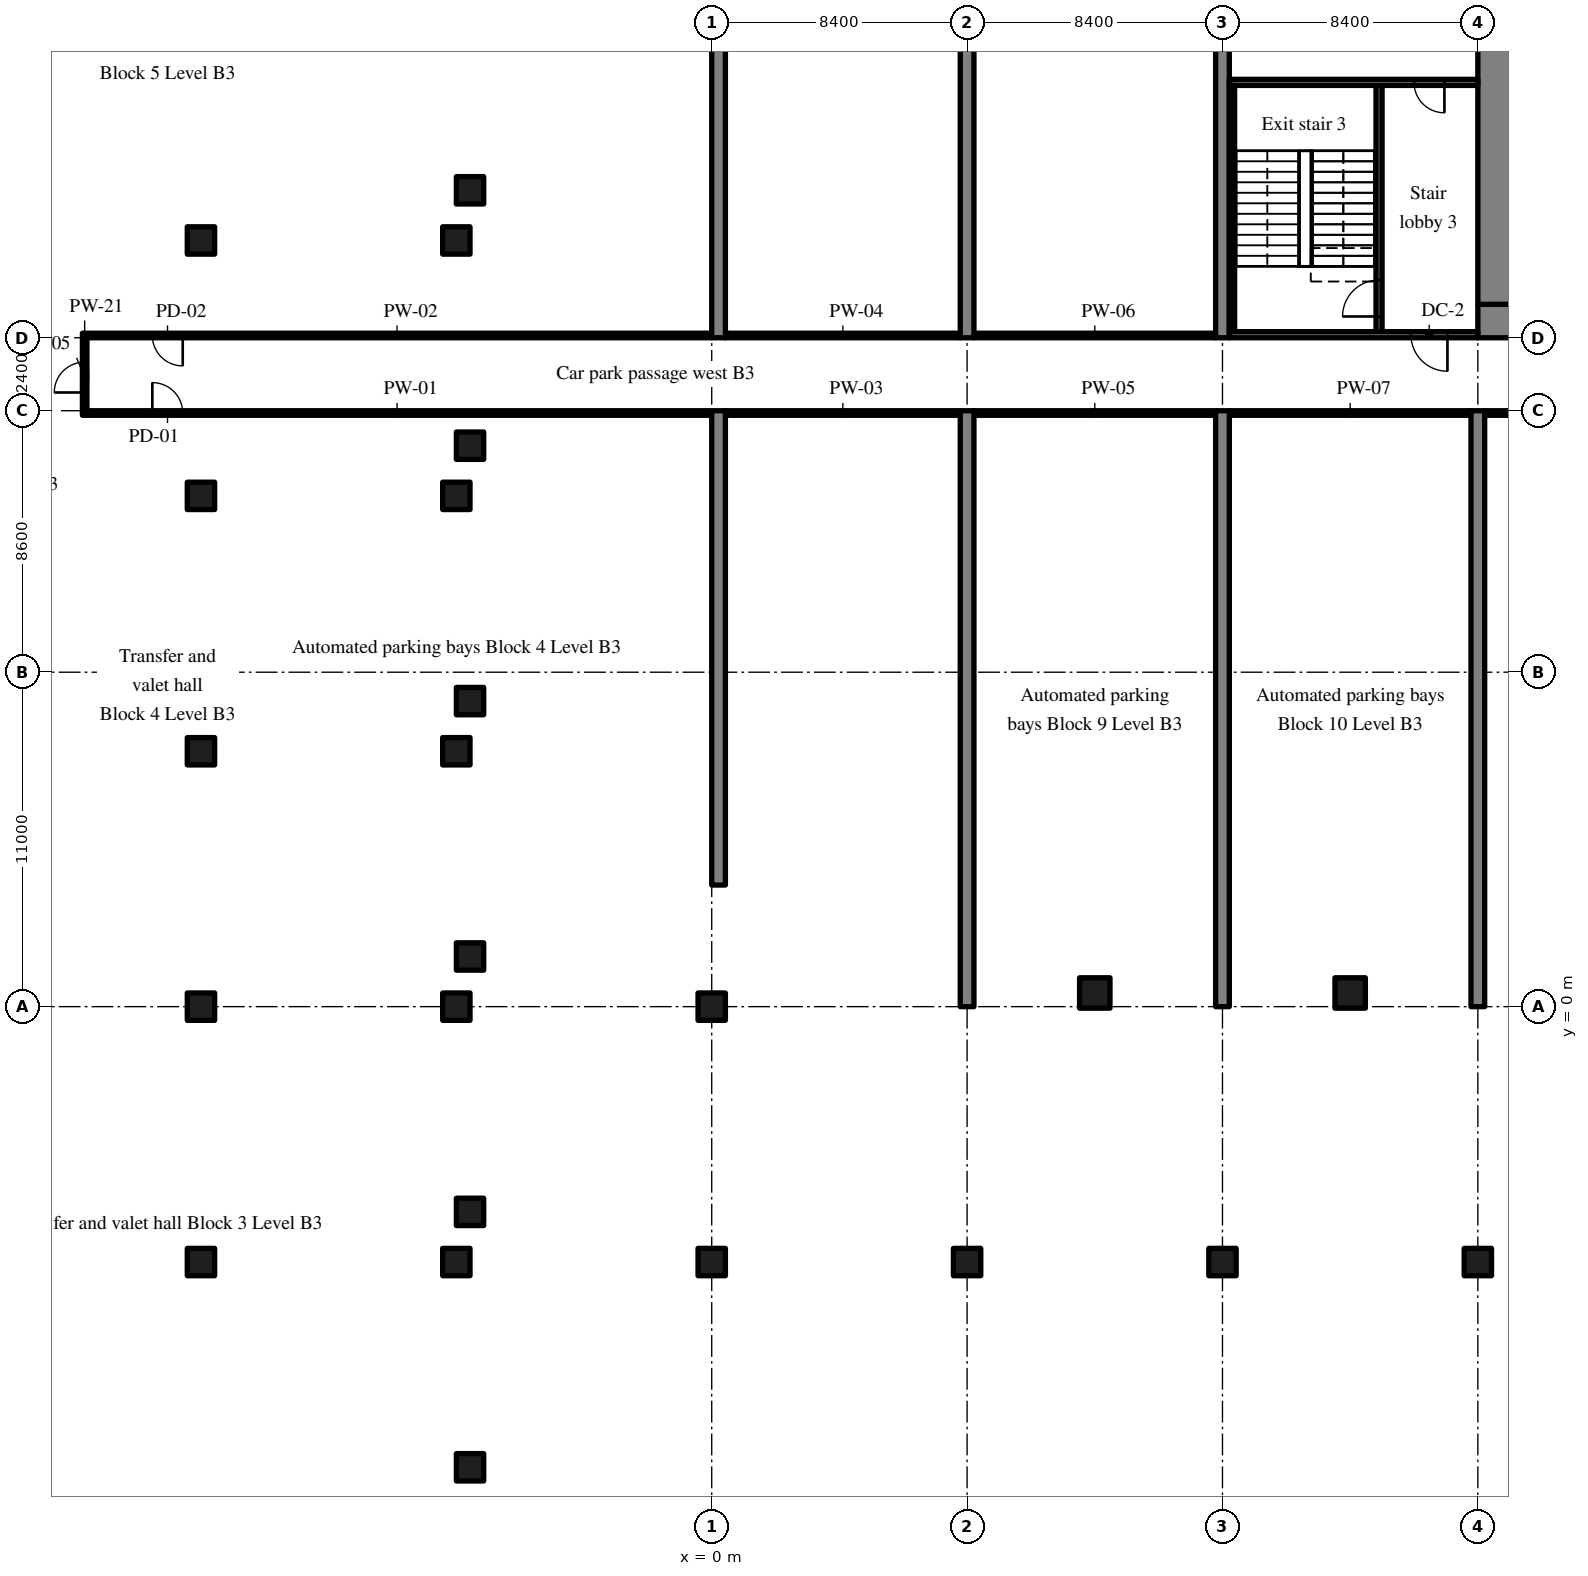
"""IFC4 building model, lengths in metres.
Left out: names, types, materials, properties, quantities, classifications, styles, units other than length and angle.
Written with IfcOpenShell. Run it as: python <this file> out.ifc"""

import sys

from ifc_helpers import new_model, si_unit, direction, frame, frame_2d, origin, origin_2d, place, context, subcontext, project, spatial, rectangle, extrude, source, transform, mapped, element, fill, save


model = new_model("IFC4")
c1 = context("Model", 3, precision=1e-05, world=origin(), true_north=direction((0.0, 1.0)))
c2 = subcontext(c1, "Body", "Model", "MODEL_VIEW")
j1 = project(units=[si_unit("LENGTHUNIT", "METRE"), si_unit("PLANEANGLEUNIT", "RADIAN")], contexts=[c1])
p1 = place(None, origin())
s1 = spatial("IfcSite", under=j1, at=p1, CompositionType="ELEMENT")
p2 = place(p1, origin())
s2 = spatial("IfcBuilding", under=s1, at=p2, CompositionType="ELEMENT")
p3 = place(p2, frame((0.0, 0.0, -13.5)))
s3 = spatial("IfcBuildingStorey", under=s2, at=p3, CompositionType="ELEMENT", Elevation=-13.5)
m1 = source(origin(), c2, "Body", "SweptSolid", [
    extrude(rectangle(XDim=50.4, YDim=1.1, at=frame_2d((25.2, 0.0))), origin(), (0.0, 0.0, 1.0), 4.52),
])
p4 = place(p3, frame((25.2, 22.55, -0.3), z_axis=(0.0, 0.0, 1.0), x_axis=(1.0, 0.0, 0.0)))
e1 = element("IfcWall", 1, at=p4, inside=s3, PredefinedType="SHEAR", context=c2, shape_type="MappedRepresentation", body=[
    mapped(m1, transform((0.0, 0.0, 0.0), scale=1.0)),
])
m2 = source(origin(), c2, "Body", "SweptSolid", [
    extrude(rectangle(XDim=1.8, YDim=2.1, at=frame_2d((0.9, 1.05))), frame((0.0, 0.56, 0.0), z_axis=(0.0, -1.0, 0.0), x_axis=(1.0, 0.0, 0.0)), (0.0, 0.0, 1.0), 1.12),
])
p5 = place(p4, frame((15.9, 0.0, 0.0)))
e2 = element("IfcOpeningElement", 2, at=p5, cuts=e1, PredefinedType="OPENING", context=c2, shape_type="MappedRepresentation", body=[
    mapped(m2, transform((0.0, 0.0, 0.0), scale=1.0)),
])
m3 = source(origin(), c2, "Body", "SweptSolid", [
    extrude(rectangle(XDim=1.2, YDim=2.1, at=frame_2d((0.6, 1.05))), frame((0.0, 0.56, 0.0), z_axis=(0.0, -1.0, 0.0), x_axis=(1.0, 0.0, 0.0)), (0.0, 0.0, 1.0), 1.12),
])
p6 = place(p4, frame((27.0, 0.0, 0.0)))
e3 = element("IfcOpeningElement", 3, at=p6, cuts=e1, PredefinedType="OPENING", context=c2, shape_type="MappedRepresentation", body=[
    mapped(m3, transform((0.0, 0.0, 0.0), scale=1.0)),
])
m4 = source(origin(), c2, "Body", "SweptSolid", [
    extrude(rectangle(XDim=0.9, YDim=2.1, at=frame_2d((0.45, 1.05))), frame((0.0, 0.56, 0.0), z_axis=(0.0, -1.0, 0.0), x_axis=(1.0, 0.0, 0.0)), (0.0, 0.0, 1.0), 1.12),
])
p7 = place(p4, frame((33.75, 0.0, 0.0)))
e4 = element("IfcOpeningElement", 4, at=p7, cuts=e1, PredefinedType="OPENING", context=c2, shape_type="MappedRepresentation", body=[
    mapped(m4, transform((0.0, 0.0, 0.0), scale=1.0)),
])
p8 = place(p4, frame((30.75, 0.0, 0.0)))
e5 = element("IfcOpeningElement", 5, at=p8, cuts=e1, PredefinedType="OPENING", context=c2, shape_type="MappedRepresentation", body=[
    mapped(m4, transform((0.0, 0.0, 0.0), scale=1.0)),
])
p9 = place(p4, frame((38.25, 0.0, 0.0)))
e6 = element("IfcOpeningElement", 6, at=p9, cuts=e1, PredefinedType="OPENING", context=c2, shape_type="MappedRepresentation", body=[
    mapped(m4, transform((0.0, 0.0, 0.0), scale=1.0)),
])
p10 = place(p4, frame((6.425, 0.0, 0.0)))
e7 = element("IfcOpeningElement", 7, at=p10, cuts=e1, PredefinedType="OPENING", context=c2, shape_type="MappedRepresentation", body=[
    mapped(m3, transform((0.0, 0.0, 0.0), scale=1.0)),
])
p11 = place(p4, frame((47.675, 0.0, 0.0)))
e8 = element("IfcOpeningElement", 8, at=p11, cuts=e1, PredefinedType="OPENING", context=c2, shape_type="MappedRepresentation", body=[
    mapped(m3, transform((0.0, 0.0, 0.0), scale=1.0)),
])
m5 = source(origin(), c2, "Body", "SweptSolid", [
    extrude(rectangle(XDim=17.8, YDim=1.1, at=frame_2d((8.9, 0.0))), origin(), (0.0, 0.0, 1.0), 4.52),
])
p12 = place(p3, frame((25.75, 23.1, -0.3), z_axis=(0.0, 0.0, 1.0), x_axis=(0.0, 1.0, 0.0)))
e9 = element("IfcWall", 9, at=p12, inside=s3, PredefinedType="SHEAR", context=c2, shape_type="MappedRepresentation", body=[
    mapped(m5, transform((0.0, 0.0, 0.0), scale=1.0)),
])
m6 = source(origin(), c2, "Body", "SweptSolid", [
    extrude(rectangle(XDim=15.6, YDim=0.45, at=frame_2d((7.8, 0.0))), origin(), (0.0, 0.0, 1.0), 4.52),
])
p13 = place(p3, frame((0.225, 4.0, -0.3), z_axis=(0.0, 0.0, 1.0), x_axis=(0.0, 1.0, 0.0)))
e10 = element("IfcWall", 10, at=p13, inside=s3, PredefinedType="SHEAR", context=c2, shape_type="MappedRepresentation", body=[
    mapped(m6, transform((0.0, 0.0, 0.0), scale=1.0)),
])
m7 = source(origin(), c2, "Body", "SweptSolid", [
    extrude(rectangle(XDim=16.0, YDim=0.45, at=frame_2d((8.0, 0.0))), origin(), (0.0, 0.0, 1.0), 4.52),
])
p14 = place(p3, frame((0.225, 22.0, -0.3), z_axis=(0.0, 0.0, 1.0), x_axis=(0.0, 1.0, 0.0)))
e11 = element("IfcWall", 11, at=p14, inside=s3, PredefinedType="SHEAR", context=c2, shape_type="MappedRepresentation", body=[
    mapped(m7, transform((0.0, 0.0, 0.0), scale=1.0)),
])
m8 = source(origin(), c2, "Body", "SweptSolid", [
    extrude(rectangle(XDim=19.6, YDim=0.45, at=frame_2d((9.8, 0.0))), origin(), (0.0, 0.0, 1.0), 4.52),
])
p15 = place(p3, frame((8.4, 0.0, -0.3), z_axis=(0.0, 0.0, 1.0), x_axis=(0.0, 1.0, 0.0)))
e12 = element("IfcWall", 12, at=p15, inside=s3, PredefinedType="SHEAR", context=c2, shape_type="MappedRepresentation", body=[
    mapped(m8, transform((0.0, 0.0, 0.0), scale=1.0)),
])
m9 = source(origin(), c2, "Body", "SweptSolid", [
    extrude(rectangle(XDim=20.0, YDim=0.45, at=frame_2d((10.0, 0.0))), origin(), (0.0, 0.0, 1.0), 4.52),
])
p16 = place(p3, frame((8.4, 22.0, -0.3), z_axis=(0.0, 0.0, 1.0), x_axis=(0.0, 1.0, 0.0)))
e13 = element("IfcWall", 13, at=p16, inside=s3, PredefinedType="SHEAR", context=c2, shape_type="MappedRepresentation", body=[
    mapped(m9, transform((0.0, 0.0, 0.0), scale=1.0)),
])
p17 = place(p3, frame((16.8, 0.0, -0.3), z_axis=(0.0, 0.0, 1.0), x_axis=(0.0, 1.0, 0.0)))
e14 = element("IfcWall", 14, at=p17, inside=s3, PredefinedType="SHEAR", context=c2, shape_type="MappedRepresentation", body=[
    mapped(m8, transform((0.0, 0.0, 0.0), scale=1.0)),
])
p18 = place(p3, frame((16.8, 22.0, -0.3), z_axis=(0.0, 0.0, 1.0), x_axis=(0.0, 1.0, 0.0)))
e15 = element("IfcWall", 15, at=p18, inside=s3, PredefinedType="SHEAR", context=c2, shape_type="MappedRepresentation", body=[
    mapped(m9, transform((0.0, 0.0, 0.0), scale=1.0)),
])
p19 = place(p3, frame((25.2, 0.0, -0.3), z_axis=(0.0, 0.0, 1.0), x_axis=(0.0, 1.0, 0.0)))
e16 = element("IfcWall", 16, at=p19, inside=s3, PredefinedType="SHEAR", context=c2, shape_type="MappedRepresentation", body=[
    mapped(m8, transform((0.0, 0.0, 0.0), scale=1.0)),
])
m10 = source(origin(), c2, "Body", "SweptSolid", [
    extrude(rectangle(XDim=1.0, YDim=1.0, at=origin_2d()), origin(), (0.0, 0.0, 1.0), 4.52),
])
for number, where, z_axis, x_axis in (
    (17, (12.6, 0.45, -0.3), (0.0, 0.0, 1.0), (1.0, 0.0, 0.0)),
    (18, (21.0, 0.45, -0.3), (0.0, 0.0, 1.0), (1.0, 0.0, 0.0)),
):
    element("IfcColumn", number, at=place(p3, frame(where, z_axis=z_axis, x_axis=x_axis)), inside=s3, PredefinedType="COLUMN", context=c2, shape_type="MappedRepresentation", body=[
        mapped(m10, transform((0.0, 0.0, 0.0), scale=1.0)),
    ])
m11 = source(origin(), c2, "Body", "SweptSolid", [
    extrude(rectangle(XDim=0.9, YDim=0.9, at=origin_2d()), origin(), (0.0, 0.0, 1.0), 4.52),
])
for number, where, z_axis, x_axis in (
    (19, (-7.95, -15.15, -0.3), (0.0, 0.0, 1.0), (1.0, 0.0, 0.0)),
    (20, (-7.95, -6.75, -0.3), (0.0, 0.0, 1.0), (1.0, 0.0, 0.0)),
    (21, (-7.95, 1.65, -0.3), (0.0, 0.0, 1.0), (1.0, 0.0, 0.0)),
    (22, (-7.95, 10.05, -0.3), (0.0, 0.0, 1.0), (1.0, 0.0, 0.0)),
    (23, (-7.95, 18.45, -0.3), (0.0, 0.0, 1.0), (1.0, 0.0, 0.0)),
    (24, (-7.95, 26.85, -0.3), (0.0, 0.0, 1.0), (1.0, 0.0, 0.0)),
    (25, (-16.8, -8.4, -0.3), (0.0, 0.0, 1.0), (1.0, 0.0, 0.0)),
    (26, (-16.8, 0.0, -0.3), (0.0, 0.0, 1.0), (1.0, 0.0, 0.0)),
    (27, (-16.8, 8.4, -0.3), (0.0, 0.0, 1.0), (1.0, 0.0, 0.0)),
    (28, (-16.8, 16.8, -0.3), (0.0, 0.0, 1.0), (1.0, 0.0, 0.0)),
    (29, (-16.8, 25.2, -0.3), (0.0, 0.0, 1.0), (1.0, 0.0, 0.0)),
    (30, (-8.4, -8.4, -0.3), (0.0, 0.0, 1.0), (1.0, 0.0, 0.0)),
    (31, (-8.4, 0.0, -0.3), (0.0, 0.0, 1.0), (1.0, 0.0, 0.0)),
    (32, (-8.4, 8.4, -0.3), (0.0, 0.0, 1.0), (1.0, 0.0, 0.0)),
    (33, (-8.4, 16.8, -0.3), (0.0, 0.0, 1.0), (1.0, 0.0, 0.0)),
    (34, (-8.4, 25.2, -0.3), (0.0, 0.0, 1.0), (1.0, 0.0, 0.0)),
    (35, (0.0, -8.4, -0.3), (0.0, 0.0, 1.0), (1.0, 0.0, 0.0)),
    (36, (0.0, 0.0, -0.3), (0.0, 0.0, 1.0), (1.0, 0.0, 0.0)),
    (37, (8.4, -8.4, -0.3), (0.0, 0.0, 1.0), (1.0, 0.0, 0.0)),
    (38, (16.8, -8.4, -0.3), (0.0, 0.0, 1.0), (1.0, 0.0, 0.0)),
    (39, (25.2, -8.4, -0.3), (0.0, 0.0, 1.0), (1.0, 0.0, 0.0)),
):
    element("IfcColumn", number, at=place(p3, frame(where, z_axis=z_axis, x_axis=x_axis)), inside=s3, PredefinedType="COLUMN", context=c2, shape_type="MappedRepresentation", body=[
        mapped(m11, transform((0.0, 0.0, 0.0), scale=1.0)),
    ])
m12 = source(origin(), c2, "Body", "SweptSolid", [
    extrude(rectangle(XDim=8.3, YDim=0.2, at=frame_2d((4.15, 0.0))), origin(), (0.0, 0.0, 1.0), 4.52),
])
p20 = place(p3, frame((21.95, 22.1, -0.3), z_axis=(0.0, 0.0, 1.0), x_axis=(0.0, 1.0, 0.0)))
e40 = element("IfcWall", 40, at=p20, inside=s3, PredefinedType="SOLIDWALL", context=c2, shape_type="MappedRepresentation", body=[
    mapped(m12, transform((0.0, 0.0, 0.0), scale=1.0)),
])
m13 = source(origin(), c2, "Body", "SweptSolid", [
    extrude(rectangle(XDim=1.2, YDim=2.1, at=frame_2d((0.6, 1.05))), frame((0.0, 0.11, 0.0), z_axis=(0.0, -1.0, 0.0), x_axis=(1.0, 0.0, 0.0)), (0.0, 0.0, 1.0), 0.22),
])
p21 = place(p20, frame((0.6, 0.0, 0.0)))
e41 = element("IfcOpeningElement", 41, at=p21, cuts=e40, PredefinedType="OPENING", context=c2, shape_type="MappedRepresentation", body=[
    mapped(m13, transform((0.0, 0.0, 0.0), scale=1.0)),
])
m14 = source(origin(), c2, "Body", "SweptSolid", [
    extrude(rectangle(XDim=8.175, YDim=0.2, at=frame_2d((4.087, 0.0))), origin(), (0.0, 0.0, 1.0), 4.52),
])
p22 = place(p3, frame((17.025, 22.1, -0.3), z_axis=(0.0, 0.0, 1.0), x_axis=(1.0, 0.0, 0.0)))
e42 = element("IfcWall", 42, at=p22, inside=s3, PredefinedType="SOLIDWALL", context=c2, shape_type="MappedRepresentation", body=[
    mapped(m14, transform((0.0, 0.0, 0.0), scale=1.0)),
])
p23 = place(p22, frame((5.975, 0.0, 0.0)))
e43 = element("IfcOpeningElement", 43, at=p23, cuts=e42, PredefinedType="OPENING", context=c2, shape_type="MappedRepresentation", body=[
    mapped(m13, transform((0.0, 0.0, 0.0), scale=1.0)),
])
p24 = place(p3, frame((17.025, 30.4, -0.3), z_axis=(0.0, 0.0, 1.0), x_axis=(1.0, 0.0, 0.0)))
e44 = element("IfcWall", 44, at=p24, inside=s3, PredefinedType="SOLIDWALL", context=c2, shape_type="MappedRepresentation", body=[
    mapped(m14, transform((0.0, 0.0, 0.0), scale=1.0)),
])
m15 = source(origin(), c2, "Body", "SweptSolid", [
    extrude(rectangle(XDim=1.0, YDim=2.1, at=frame_2d((0.5, 1.05))), frame((0.0, 0.11, 0.0), z_axis=(0.0, -1.0, 0.0), x_axis=(1.0, 0.0, 0.0)), (0.0, 0.0, 1.0), 0.22),
])
p25 = place(p24, frame((6.075, 0.0, 0.0)))
e45 = element("IfcOpeningElement", 45, at=p25, cuts=e44, PredefinedType="OPENING", context=c2, shape_type="MappedRepresentation", body=[
    mapped(m15, transform((0.0, 0.0, 0.0), scale=1.0)),
])
m16 = source(origin(), c2, "Body", "SweptSolid", [
    extrude(rectangle(XDim=8.1, YDim=0.175, at=frame_2d((4.05, 0.0))), origin(), (0.0, 0.0, 1.0), 4.52),
])
p26 = place(p3, frame((17.112, 22.2, -0.3), z_axis=(0.0, 0.0, 1.0), x_axis=(0.0, 1.0, 0.0)))
e46 = element("IfcWall", 46, at=p26, inside=s3, PredefinedType="SOLIDWALL", context=c2, shape_type="MappedRepresentation", body=[
    mapped(m16, transform((0.0, 0.0, 0.0), scale=1.0)),
])
m17 = source(origin(), c2, "Body", "SweptSolid", [
    extrude(rectangle(XDim=20.7, YDim=0.15, at=frame_2d((10.35, 0.0))), origin(), (0.0, 0.0, 1.0), 4.22),
])
p27 = place(p3, frame((-20.7, 19.525, 0.0), z_axis=(0.0, 0.0, 1.0), x_axis=(1.0, 0.0, 0.0)))
e47 = element("IfcWall", 47, at=p27, inside=s3, PredefinedType="PARTITIONING", context=c2, shape_type="MappedRepresentation", body=[
    mapped(m17, transform((0.0, 0.0, 0.0), scale=1.0)),
])
m18 = source(origin(), c2, "Body", "SweptSolid", [
    extrude(rectangle(XDim=1.0, YDim=2.1, at=frame_2d((0.5, 1.05))), frame((0.0, 0.085, 0.0), z_axis=(0.0, -1.0, 0.0), x_axis=(1.0, 0.0, 0.0)), (0.0, 0.0, 1.0), 0.17),
])
p28 = place(p27, frame((2.3, 0.0, 0.0)))
e48 = element("IfcOpeningElement", 48, at=p28, cuts=e47, PredefinedType="OPENING", context=c2, shape_type="MappedRepresentation", body=[
    mapped(m18, transform((0.0, 0.0, 0.0), scale=1.0)),
])
p29 = place(p3, frame((-20.7, 22.075, 0.0), z_axis=(0.0, 0.0, 1.0), x_axis=(1.0, 0.0, 0.0)))
e49 = element("IfcWall", 49, at=p29, inside=s3, PredefinedType="PARTITIONING", context=c2, shape_type="MappedRepresentation", body=[
    mapped(m17, transform((0.0, 0.0, 0.0), scale=1.0)),
])
p30 = place(p29, frame((2.3, 0.0, 0.0)))
e50 = element("IfcOpeningElement", 50, at=p30, cuts=e49, PredefinedType="OPENING", context=c2, shape_type="MappedRepresentation", body=[
    mapped(m18, transform((0.0, 0.0, 0.0), scale=1.0)),
])
m19 = source(origin(), c2, "Body", "SweptSolid", [
    extrude(rectangle(XDim=7.725, YDim=0.15, at=frame_2d((3.863, 0.0))), origin(), (0.0, 0.0, 1.0), 4.22),
])
for number, where, z_axis, x_axis in (
    (51, (0.45, 19.525, 0.0), (0.0, 0.0, 1.0), (1.0, 0.0, 0.0)),
    (52, (0.45, 22.075, 0.0), (0.0, 0.0, 1.0), (1.0, 0.0, 0.0)),
):
    element("IfcWall", number, at=place(p3, frame(where, z_axis=z_axis, x_axis=x_axis)), inside=s3, PredefinedType="PARTITIONING", context=c2, shape_type="MappedRepresentation", body=[
        mapped(m19, transform((0.0, 0.0, 0.0), scale=1.0)),
    ])
m20 = source(origin(), c2, "Body", "SweptSolid", [
    extrude(rectangle(XDim=7.95, YDim=0.15, at=frame_2d((3.975, 0.0))), origin(), (0.0, 0.0, 1.0), 4.22),
])
for number, where, z_axis, x_axis in (
    (53, (8.625, 19.525, 0.0), (0.0, 0.0, 1.0), (1.0, 0.0, 0.0)),
    (54, (8.625, 22.075, 0.0), (0.0, 0.0, 1.0), (1.0, 0.0, 0.0)),
):
    element("IfcWall", number, at=place(p3, frame(where, z_axis=z_axis, x_axis=x_axis)), inside=s3, PredefinedType="PARTITIONING", context=c2, shape_type="MappedRepresentation", body=[
        mapped(m20, transform((0.0, 0.0, 0.0), scale=1.0)),
    ])
m21 = source(origin(), c2, "Body", "SweptSolid", [
    extrude(rectangle(XDim=7.95, YDim=0.15, at=frame_2d((3.975, 0.0))), origin(), (0.0, 0.0, 1.0), 4.22),
])
p31 = place(p3, frame((17.025, 19.525, 0.0), z_axis=(0.0, 0.0, 1.0), x_axis=(1.0, 0.0, 0.0)))
e55 = element("IfcWall", 55, at=p31, inside=s3, PredefinedType="PARTITIONING", context=c2, shape_type="MappedRepresentation", body=[
    mapped(m21, transform((0.0, 0.0, 0.0), scale=1.0)),
])
p32 = place(p3, frame((25.425, 19.525, 0.0), z_axis=(0.0, 0.0, 1.0), x_axis=(1.0, 0.0, 0.0)))
e56 = element("IfcWall", 56, at=p32, inside=s3, PredefinedType="PARTITIONING", context=c2, shape_type="MappedRepresentation", body=[
    mapped(m20, transform((0.0, 0.0, 0.0), scale=1.0)),
])
m22 = source(origin(), c2, "Body", "SweptSolid", [
    extrude(rectangle(XDim=2.4, YDim=0.15, at=frame_2d((1.2, 0.0))), origin(), (0.0, 0.0, 1.0), 4.22),
])
p33 = place(p3, frame((-20.625, 19.6, 0.0), z_axis=(0.0, 0.0, 1.0), x_axis=(0.0, 1.0, 0.0)))
e57 = element("IfcWall", 57, at=p33, inside=s3, PredefinedType="PARTITIONING", context=c2, shape_type="MappedRepresentation", body=[
    mapped(m22, transform((0.0, 0.0, 0.0), scale=1.0)),
])
p34 = place(p33, frame((0.6, 0.0, 0.0)))
e58 = element("IfcOpeningElement", 58, at=p34, cuts=e57, PredefinedType="OPENING", context=c2, shape_type="MappedRepresentation", body=[
    mapped(m18, transform((0.0, 0.0, 0.0), scale=1.0)),
])
m23 = source(origin(), c2, "Body", "SweptSolid", [
    extrude(rectangle(XDim=1.2, YDim=2.1, at=frame_2d((0.6, 1.05))), frame((0.0, 0.025, 0.0), z_axis=(0.0, -1.0, 0.0), x_axis=(1.0, 0.0, 0.0)), (0.0, 0.0, 1.0), 0.05),
])
p35 = place(p21, origin())
e59 = element("IfcDoor", 59, at=p35, inside=s3, OperationType="SINGLE_SWING_LEFT", PredefinedType="DOOR", context=c2, shape_type="MappedRepresentation", body=[
    mapped(m23, transform((0.0, 0.0, 0.0), scale=1.0)),
])
fill(e41, e59)
p36 = place(p23, origin())
e60 = element("IfcDoor", 60, at=p36, inside=s3, OperationType="SINGLE_SWING_RIGHT", PredefinedType="DOOR", context=c2, shape_type="MappedRepresentation", body=[
    mapped(m23, transform((0.0, 0.0, 0.0), scale=1.0)),
])
fill(e43, e60)
m24 = source(origin(), c2, "Body", "SweptSolid", [
    extrude(rectangle(XDim=1.0, YDim=2.1, at=frame_2d((0.5, 1.05))), frame((0.0, 0.025, 0.0), z_axis=(0.0, -1.0, 0.0), x_axis=(1.0, 0.0, 0.0)), (0.0, 0.0, 1.0), 0.05),
])
p37 = place(p25, origin())
e61 = element("IfcDoor", 61, at=p37, inside=s3, OperationType="SINGLE_SWING_RIGHT", PredefinedType="DOOR", context=c2, shape_type="MappedRepresentation", body=[
    mapped(m24, transform((0.0, 0.0, 0.0), scale=1.0)),
])
fill(e45, e61)
p38 = place(p28, origin())
e62 = element("IfcDoor", 62, at=p38, inside=s3, OperationType="SINGLE_SWING_LEFT", PredefinedType="DOOR", context=c2, shape_type="MappedRepresentation", body=[
    mapped(m24, transform((0.0, 0.0, 0.0), scale=1.0)),
])
fill(e48, e62)
p39 = place(p30, origin())
e63 = element("IfcDoor", 63, at=p39, inside=s3, OperationType="SINGLE_SWING_RIGHT", PredefinedType="DOOR", context=c2, shape_type="MappedRepresentation", body=[
    mapped(m24, transform((0.0, 0.0, 0.0), scale=1.0)),
])
fill(e50, e63)
p40 = place(p34, origin())
e64 = element("IfcDoor", 64, at=p40, inside=s3, OperationType="SINGLE_SWING_LEFT", PredefinedType="DOOR", context=c2, shape_type="MappedRepresentation", body=[
    mapped(m24, transform((0.0, 0.0, 0.0), scale=1.0)),
])
fill(e58, e64)
save(model, sys.argv[1])
